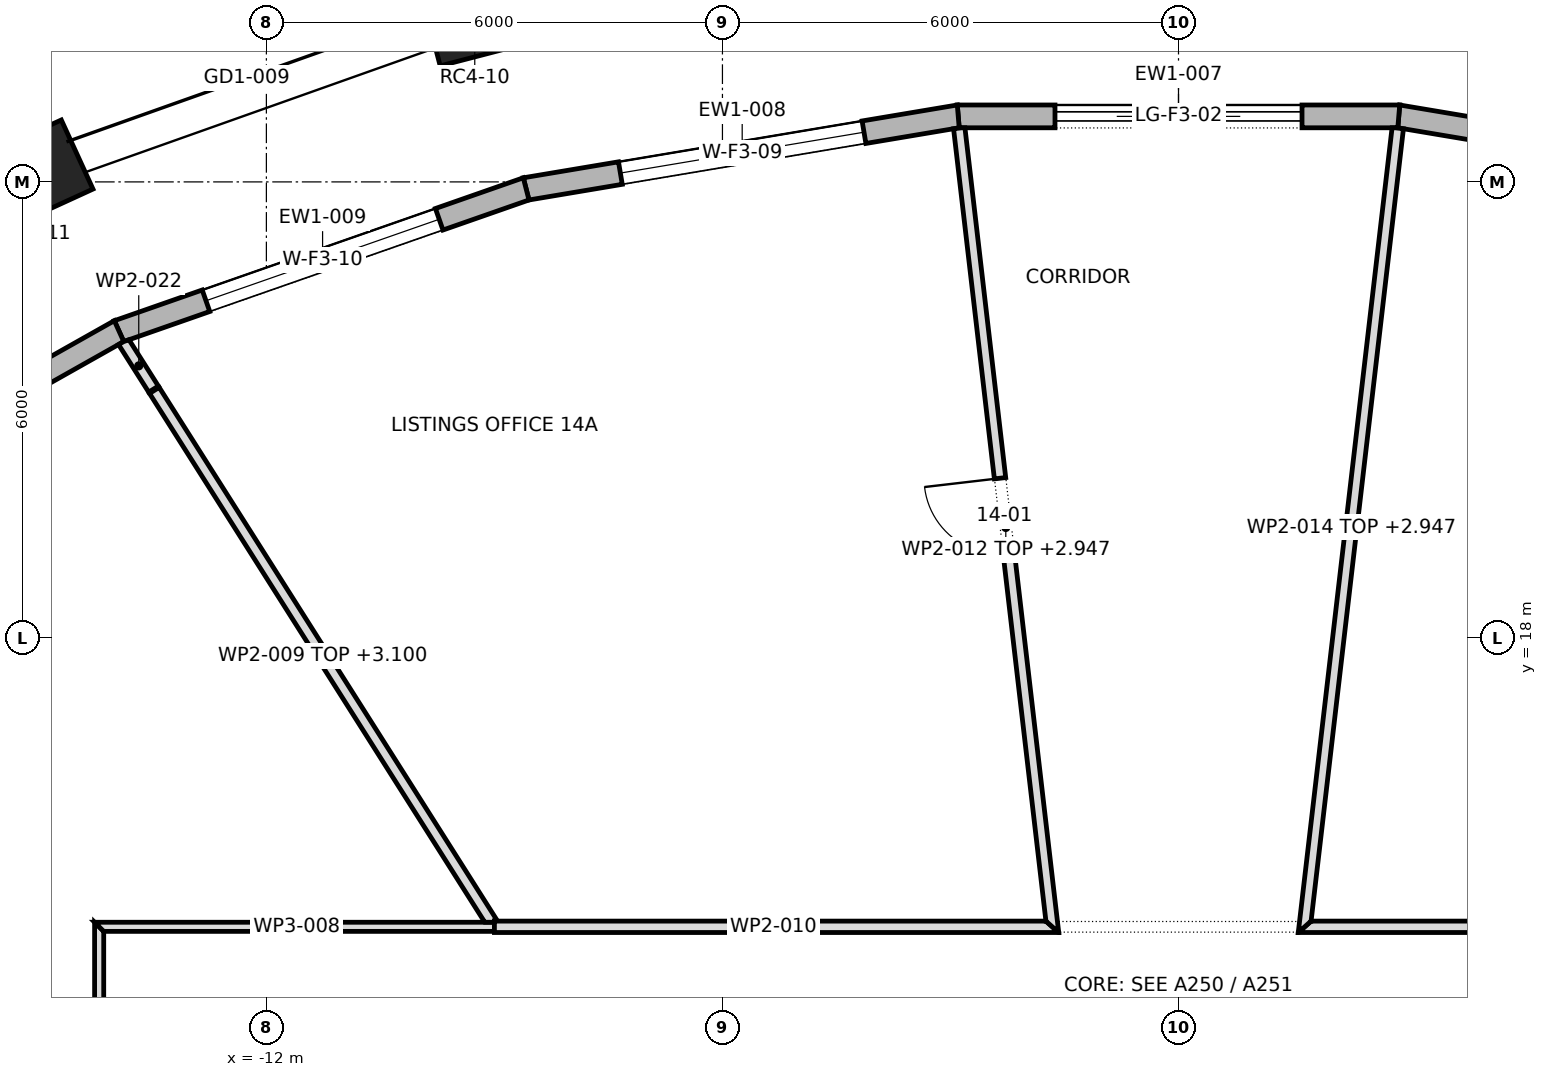
"""IFC4 building model, lengths in metres.
Left out: names, types, materials, properties, quantities, classifications, styles, units other than length and angle.
Written with IfcOpenShell. Run it as: python <this file> out.ifc"""

import sys

from ifc_helpers import new_model, si_unit, direction, frame, frame_2d, origin, origin_2d, place, context, subcontext, project, spatial, polyline, rectangle, outline, extrude, element, fill, save


model = new_model("IFC4")
c1 = context("Model", 3, precision=1e-05, world=origin(), true_north=direction((0.0, 1.0)))
c2 = subcontext(c1, "Body", "Model", "MODEL_VIEW")
j1 = project(units=[si_unit("LENGTHUNIT", "METRE"), si_unit("PLANEANGLEUNIT", "RADIAN")], contexts=[c1])
p1 = place(None, origin())
s1 = spatial("IfcSite", under=j1, at=p1, CompositionType="ELEMENT")
p2 = place(p1, origin())
s2 = spatial("IfcBuilding", under=s1, at=p2, CompositionType="ELEMENT")
p3 = place(p2, frame((0.0, 0.0, 210.9)))
s3 = spatial("IfcBuildingStorey", under=s2, at=p3, CompositionType="ELEMENT", Elevation=210.9)
for number, where, z_axis, x_axis in (
    (1, (-9.259, 26.161, 0.0), (0.0, 0.0, 1.0), (-0.968, -0.252, 0.0)),
    (2, (-15.035, 24.11, 0.0), (0.0, 0.0, 1.0), (-0.909, -0.417, 0.0)),
):
    element("IfcColumn", number, at=place(p3, frame(where, z_axis=z_axis, x_axis=x_axis)), inside=s3, PredefinedType="COLUMN", context=c2, shape_type="SweptSolid", body=[
        extrude(rectangle(XDim=1.2, YDim=1.0, at=origin_2d()), origin(), (0.0, 0.0, 1.0), 4.0),
    ])
p4 = place(p3, frame((8.583, 23.908, 0.0), z_axis=(0.0, 0.0, 1.0), x_axis=(-0.98622052717, 0.165436005116, 0.0)))
e3 = element("IfcWall", 3, at=p4, inside=s3, PredefinedType="STANDARD", context=c2, shape_type="SweptSolid", body=[
    extrude(outline(polyline([(-0.013, -0.15), (5.777, -0.15), (5.752, 0.15), (0.013, 0.15), (-0.013, -0.15)])), origin(), (0.0, 0.0, 1.0), 3.7),
])
p5 = place(p4, frame((1.257, 0.0, 0.6)))
e4 = element("IfcOpeningElement", 4, at=p5, cuts=e3, PredefinedType="OPENING", context=c2, shape_type="SweptSolid", body=[
    extrude(rectangle(XDim=3.25, YDim=2.65, at=frame_2d((1.625, 1.325))), frame((0.0, 0.162, 0.0), z_axis=(0.0, -1.0, 0.0), x_axis=(1.0, 0.0, 0.0)), (0.0, 0.0, 1.0), 0.324),
])
p6 = place(p3, frame((2.898, 24.862, 0.0), z_axis=(0.0, 0.0, 1.0), x_axis=(-1.0, 0.0, 0.0)))
e5 = element("IfcWall", 5, at=p6, inside=s3, PredefinedType="STANDARD", context=c2, shape_type="SweptSolid", body=[
    extrude(outline(polyline([(-0.012, -0.15), (5.808, -0.15), (5.783, 0.15), (0.012, 0.15), (-0.012, -0.15)])), origin(), (0.0, 0.0, 1.0), 3.7),
])
p7 = place(p6, frame((1.273, 0.0, 0.0)))
e6 = element("IfcOpeningElement", 6, at=p7, cuts=e5, PredefinedType="OPENING", context=c2, shape_type="SweptSolid", body=[
    extrude(rectangle(XDim=3.25, YDim=3.25, at=frame_2d((1.625, 1.625))), frame((0.0, 0.162, 0.0), z_axis=(0.0, -1.0, 0.0), x_axis=(1.0, 0.0, 0.0)), (0.0, 0.0, 1.0), 0.324),
])
p8 = place(p3, frame((-2.898, 24.862, 0.0), z_axis=(0.0, 0.0, 1.0), x_axis=(-0.98622052717, -0.165436005116, 0.0)))
e7 = element("IfcWall", 7, at=p8, inside=s3, PredefinedType="STANDARD", context=c2, shape_type="SweptSolid", body=[
    extrude(outline(polyline([(-0.012, -0.15), (5.777, -0.15), (5.751, 0.15), (0.012, 0.15), (-0.012, -0.15)])), origin(), (0.0, 0.0, 1.0), 3.7),
])
p9 = place(p8, frame((1.257, 0.0, 0.6)))
e8 = element("IfcOpeningElement", 8, at=p9, cuts=e7, PredefinedType="OPENING", context=c2, shape_type="SweptSolid", body=[
    extrude(rectangle(XDim=3.25, YDim=2.65, at=frame_2d((1.625, 1.325))), frame((0.0, 0.162, 0.0), z_axis=(0.0, -1.0, 0.0), x_axis=(1.0, 0.0, 0.0)), (0.0, 0.0, 1.0), 0.324),
])
p10 = place(p3, frame((-8.583, 23.908, 0.0), z_axis=(0.0, 0.0, 1.0), x_axis=(-0.944023272224, -0.329878858824, 0.0)))
e9 = element("IfcWall", 9, at=p10, inside=s3, PredefinedType="STANDARD", context=c2, shape_type="SweptSolid", body=[
    extrude(outline(polyline([(-0.013, -0.15), (5.687, -0.15), (5.66, 0.15), (0.013, 0.15), (-0.013, -0.15)])), origin(), (0.0, 0.0, 1.0), 3.7),
])
p11 = place(p10, frame((1.212, 0.0, 0.6)))
e10 = element("IfcOpeningElement", 10, at=p11, cuts=e9, PredefinedType="OPENING", context=c2, shape_type="SweptSolid", body=[
    extrude(rectangle(XDim=3.25, YDim=2.65, at=frame_2d((1.625, 1.325))), frame((0.0, 0.162, 0.0), z_axis=(0.0, -1.0, 0.0), x_axis=(1.0, 0.0, 0.0)), (0.0, 0.0, 1.0), 0.324),
])
p12 = place(p3, frame((-13.938, 22.037, 0.0), z_axis=(0.0, 0.0, 1.0), x_axis=(-0.871140546168, -0.491033755278, 0.0)))
e11 = element("IfcWall", 11, at=p12, inside=s3, PredefinedType="STANDARD", context=c2, shape_type="SweptSolid", body=[
    extrude(outline(polyline([(-0.013, -0.15), (5.55, -0.15), (5.521, 0.15), (0.013, 0.15), (-0.013, -0.15)])), origin(), (0.0, 0.0, 1.0), 3.7),
])
p13 = place(p12, frame((1.143, 0.0, 0.6)))
e12 = element("IfcOpeningElement", 12, at=p13, cuts=e11, PredefinedType="OPENING", context=c2, shape_type="SweptSolid", body=[
    extrude(rectangle(XDim=3.25, YDim=2.65, at=frame_2d((1.625, 1.325))), frame((0.0, 0.162, 0.0), z_axis=(0.0, -1.0, 0.0), x_axis=(1.0, 0.0, 0.0)), (0.0, 0.0, 1.0), 0.324),
])
p14 = place(p3, frame((-14.2, 1.115, 0.0), z_axis=(0.0, 0.0, 1.0), x_axis=(0.0, 1.0, 0.0)))
e13 = element("IfcWall", 13, at=p14, inside=s3, PredefinedType="PARTITIONING", context=c2, shape_type="SweptSolid", body=[
    extrude(outline(polyline([(0.0, -0.06), (1.861, -0.06), (3.721, -0.06), (5.582, -0.06), (7.443, -0.06), (9.304, -0.06), (11.164, -0.06), (13.025, -0.06), (13.145, 0.06), (11.286, 0.06), (9.427, 0.06), (7.567, 0.06), (5.708, 0.06), (3.849, 0.06), (1.99, 0.06), (0.13, 0.06), (0.0, -0.06), (0.0, -0.06)])), origin(), (0.0, 0.0, 1.0), 3.7),
])
p15 = place(p3, frame((-14.26, 14.2, 0.0), z_axis=(0.0, 0.0, 1.0), x_axis=(1.0, 0.0, 0.0)))
e14 = element("IfcWall", 14, at=p15, inside=s3, PredefinedType="PARTITIONING", context=c2, shape_type="SweptSolid", body=[
    extrude(outline(polyline([(5.26, 0.06), (3.507, 0.06), (1.753, 0.06), (0.0, 0.06), (0.12, -0.06), (1.833, -0.06), (3.547, -0.06), (5.26, -0.06), (5.26, 0.06)])), origin(), (0.0, 0.0, 1.0), 3.7),
])
p16 = place(p3, frame((-9.022, 14.235, 0.0), z_axis=(0.0, 0.0, 1.0), x_axis=(-0.535447641226, 0.844568424407, 0.0)))
e15 = element("IfcWall", 15, at=p16, inside=s3, PredefinedType="PARTITIONING", context=c2, shape_type="SweptSolid", body=[
    extrude(outline(polyline([(8.324, 0.075), (6.675, 0.075), (5.025, 0.075), (3.376, 0.075), (1.727, 0.075), (0.077, 0.075), (0.009, -0.032), (0.022, -0.04), (0.0, -0.074), (0.0, -0.075), (1.665, -0.075), (3.33, -0.075), (4.995, -0.075), (6.66, -0.075), (8.324, -0.075), (8.324, 0.075)])), origin(), (0.0, 0.0, 1.0), 3.1),
])
p17 = place(p3, frame((-9.0, 14.2, 0.0), z_axis=(0.0, 0.0, 1.0), x_axis=(1.0, 0.0, 0.0)))
e16 = element("IfcWall", 16, at=p17, inside=s3, PredefinedType="PARTITIONING", context=c2, shape_type="SweptSolid", body=[
    extrude(outline(polyline([(0.0, -0.075), (1.856, -0.075), (3.712, -0.075), (5.568, -0.075), (7.424, -0.075), (7.256, 0.075), (5.442, 0.075), (3.628, 0.075), (1.814, 0.075), (0.0, 0.075), (0.0, -0.075)])), origin(), (0.0, 0.0, 1.0), 3.7),
])
p18 = place(p3, frame((-1.65, 14.116, 0.0), z_axis=(0.0, 0.0, 1.0), x_axis=(-0.115779808049, 0.99327490457, 0.0)))
e17 = element("IfcWall", 17, at=p18, inside=s3, PredefinedType="PARTITIONING", context=c2, shape_type="SweptSolid", body=[
    extrude(outline(polyline([(0.0, -0.075), (1.777, -0.075), (3.553, -0.075), (5.329, -0.075), (7.106, -0.075), (8.882, -0.075), (10.659, -0.075), (10.664, -0.033), (10.664, 0.075), (8.914, 0.075), (7.165, 0.075), (5.416, 0.075), (3.667, 0.075), (1.918, 0.075), (0.168, 0.075), (0.084, 0.0), (0.0, -0.075)])), origin(), (0.0, 0.0, 1.0), 2.947),
])
p19 = place(p18, frame((5.026, 0.0, 0.0)))
e18 = element("IfcOpeningElement", 18, at=p19, cuts=e17, PredefinedType="OPENING", context=c2, shape_type="SweptSolid", body=[
    extrude(rectangle(XDim=1.0, YDim=2.1, at=frame_2d((0.5, 1.05))), frame((0.0, 0.087, 0.0), z_axis=(0.0, -1.0, 0.0), x_axis=(1.0, 0.0, 0.0)), (0.0, 0.0, 1.0), 0.174),
])
p20 = place(p3, frame((1.576, 14.2, 0.0), z_axis=(0.0, 0.0, 1.0), x_axis=(1.0, 0.0, 0.0)))
e19 = element("IfcWall", 19, at=p20, inside=s3, PredefinedType="PARTITIONING", context=c2, shape_type="SweptSolid", body=[
    extrude(outline(polyline([(0.0, -0.075), (1.793, -0.075), (3.585, -0.075), (5.378, -0.075), (7.171, -0.075), (8.964, -0.075), (10.757, -0.075), (12.549, -0.075), (12.699, 0.075), (10.909, 0.075), (9.119, 0.075), (7.329, 0.075), (5.539, 0.075), (3.749, 0.075), (1.958, 0.075), (0.168, 0.075), (0.0, -0.075)])), origin(), (0.0, 0.0, 1.0), 3.7),
])
p21 = place(p20, frame((5.454, 0.0, 0.0)))
e20 = element("IfcOpeningElement", 20, at=p21, cuts=e19, PredefinedType="OPENING", context=c2, shape_type="SweptSolid", body=[
    extrude(rectangle(XDim=1.8, YDim=2.1, at=frame_2d((0.9, 1.05))), frame((0.0, 0.087, 0.0), z_axis=(0.0, -1.0, 0.0), x_axis=(1.0, 0.0, 0.0)), (0.0, 0.0, 1.0), 0.174),
])
p22 = place(p3, frame((2.885, 24.708, 0.0), z_axis=(0.0, 0.0, 1.0), x_axis=(-0.115779808049, -0.99327490457, 0.0)))
e21 = element("IfcWall", 21, at=p22, inside=s3, PredefinedType="PARTITIONING", context=c2, shape_type="SweptSolid", body=[
    extrude(outline(polyline([(0.005, -0.075), (1.781, -0.075), (3.558, -0.075), (5.334, -0.075), (7.111, -0.075), (8.887, -0.075), (10.663, -0.075), (10.579, 0.0), (10.495, 0.075), (8.746, 0.075), (6.997, 0.075), (5.248, 0.075), (3.498, 0.075), (1.749, 0.075), (0.0, 0.075), (0.0, -0.034), (0.005, -0.075)])), origin(), (0.0, 0.0, 1.0), 2.947),
])
p23 = place(p3, frame((-13.479, 21.266, 0.0), z_axis=(0.0, 0.0, 1.0), x_axis=(-0.535361185811, 0.844623230042, 0.0)))
e22 = element("IfcWall", 22, at=p23, inside=s3, PredefinedType="PARTITIONING", context=c2, shape_type="SweptSolid", body=[
    extrude(outline(polyline([(0.0, -0.075), (0.731, -0.075), (0.748, -0.004), (0.751, 0.067), (0.751, 0.075), (0.0, 0.075), (0.0, -0.075)])), origin(), (0.0, 0.0, 1.0), 3.7),
])
p24 = place(p7, origin())
e23 = element("IfcDoor", 23, at=p24, inside=s3, OperationType="DOUBLE_DOOR_SLIDING", PredefinedType="DOOR", context=c2, shape_type="SweptSolid", body=[
    extrude(rectangle(XDim=3.25, YDim=3.25, at=frame_2d((1.625, 1.625))), frame((0.0, 0.025, 0.0), z_axis=(0.0, -1.0, 0.0), x_axis=(1.0, 0.0, 0.0)), (0.0, 0.0, 1.0), 0.05),
])
fill(e6, e23)
p25 = place(p9, origin())
e24 = element("IfcWindow", 24, at=p25, inside=s3, PartitioningType="TRIPLE_PANEL_VERTICAL", PredefinedType="WINDOW", context=c2, shape_type="SweptSolid", body=[
    extrude(rectangle(XDim=3.25, YDim=2.65, at=frame_2d((1.625, 1.325))), frame((0.0, 0.03, 0.0), z_axis=(0.0, -1.0, 0.0), x_axis=(1.0, 0.0, 0.0)), (0.0, 0.0, 1.0), 0.06),
])
fill(e8, e24)
p26 = place(p11, origin())
e25 = element("IfcWindow", 25, at=p26, inside=s3, PartitioningType="TRIPLE_PANEL_VERTICAL", PredefinedType="WINDOW", context=c2, shape_type="SweptSolid", body=[
    extrude(rectangle(XDim=3.25, YDim=2.65, at=frame_2d((1.625, 1.325))), frame((0.0, 0.03, 0.0), z_axis=(0.0, -1.0, 0.0), x_axis=(1.0, 0.0, 0.0)), (0.0, 0.0, 1.0), 0.06),
])
fill(e10, e25)
p27 = place(p19, origin())
e26 = element("IfcDoor", 26, at=p27, inside=s3, OperationType="SINGLE_SWING_LEFT", PredefinedType="DOOR", context=c2, shape_type="SweptSolid", body=[
    extrude(rectangle(XDim=1.0, YDim=2.1, at=frame_2d((0.5, 1.05))), frame((0.0, 0.025, 0.0), z_axis=(0.0, -1.0, 0.0), x_axis=(1.0, 0.0, 0.0)), (0.0, 0.0, 1.0), 0.05),
])
fill(e18, e26)
save(model, sys.argv[1])
